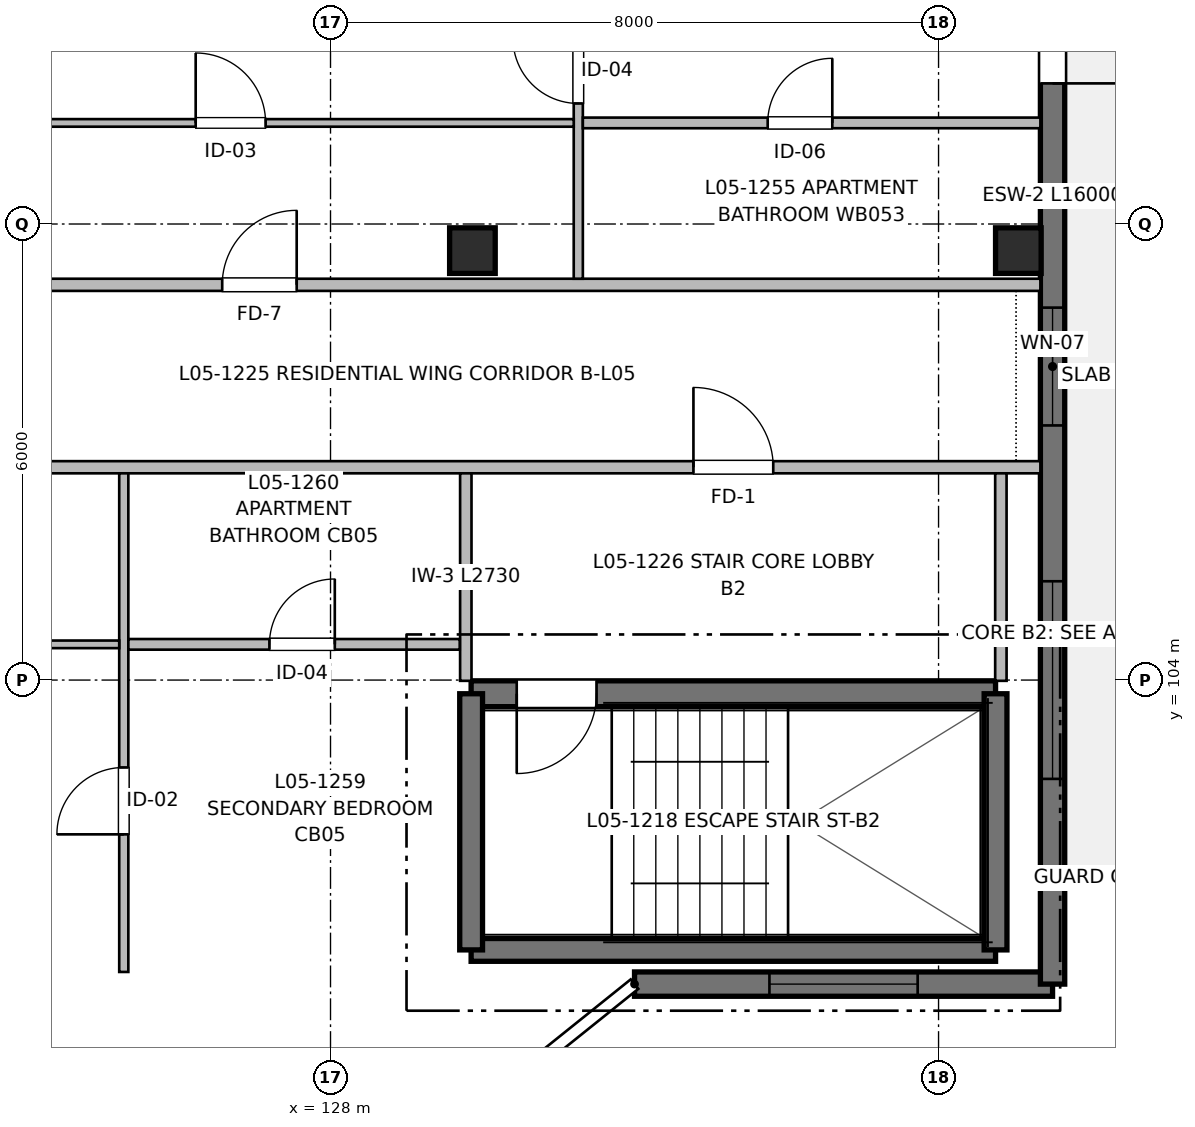
"""IFC4 building model, lengths in metres.
Left out: names, types, materials, properties, quantities, classifications, styles, units other than length and angle.
Written with IfcOpenShell. Run it as: python <this file> out.ifc"""

import sys

from ifc_helpers import new_model, si_unit, direction, frame, frame_2d, origin, origin_2d, place, context, subcontext, project, spatial, rectangle, extrude, element, fill, save


model = new_model("IFC4")
c1 = context("Model", 3, precision=1e-05, world=origin(), true_north=direction((0.0, 1.0)))
c2 = subcontext(c1, "Body", "Model", "MODEL_VIEW")
j1 = project(units=[si_unit("LENGTHUNIT", "METRE"), si_unit("PLANEANGLEUNIT", "RADIAN")], contexts=[c1])
p1 = place(None, origin())
s1 = spatial("IfcSite", under=j1, at=p1, CompositionType="ELEMENT")
p2 = place(p1, origin())
s2 = spatial("IfcBuilding", under=s1, at=p2, CompositionType="ELEMENT")
p3 = place(p2, frame((0.0, 0.0, 16.96)))
s3 = spatial("IfcBuildingStorey", under=s2, at=p3, CompositionType="ELEMENT", Elevation=16.96)
for number, where, z_axis, x_axis in (
    (1, (129.867, 109.65, 0.0), (0.0, 0.0, 1.0), (1.0, 0.0, 0.0)),
    (2, (137.05, 109.65, 0.0), (0.0, 0.0, 1.0), (1.0, 0.0, 0.0)),
):
    element("IfcColumn", number, at=place(p3, frame(where, z_axis=z_axis, x_axis=x_axis)), inside=s3, PredefinedType="COLUMN", context=c2, shape_type="SweptSolid", body=[
        extrude(rectangle(XDim=0.6, YDim=0.6, at=origin_2d()), origin(), (0.0, 0.0, 1.0), 3.2),
    ])
p4 = place(p3, frame((129.85, 100.45, 0.0), z_axis=(0.0, 0.0, 1.0), x_axis=(1.0, 0.0, 0.0)))
e3 = element("IfcWall", 3, at=p4, inside=s3, PredefinedType="SHEAR", context=c2, shape_type="SweptSolid", body=[
    extrude(rectangle(XDim=6.9, YDim=0.3, at=frame_2d((3.45, 0.0))), origin(), (0.0, 0.0, 1.0), 3.2),
])
p5 = place(p3, frame((136.75, 103.82, 0.0), z_axis=(0.0, 0.0, 1.0), x_axis=(-1.0, 0.0, 0.0)))
e4 = element("IfcWall", 4, at=p5, inside=s3, PredefinedType="SHEAR", context=c2, shape_type="SweptSolid", body=[
    extrude(rectangle(XDim=6.9, YDim=0.34, at=frame_2d((3.45, 0.0))), origin(), (0.0, 0.0, 1.0), 3.2),
])
p6 = place(p5, frame((5.25, 0.0, 0.0)))
e5 = element("IfcOpeningElement", 5, at=p6, cuts=e4, PredefinedType="OPENING", context=c2, shape_type="SweptSolid", body=[
    extrude(rectangle(XDim=1.05, YDim=2.15, at=frame_2d((0.525, 1.075))), frame((0.0, 0.18, 0.0), z_axis=(0.0, -1.0, 0.0), x_axis=(1.0, 0.0, 0.0)), (0.0, 0.0, 1.0), 0.36),
])
for number, where, z_axis, x_axis in (
    (6, (129.85, 103.82, 0.0), (0.0, 0.0, 1.0), (0.0, -1.0, 0.0)),
    (7, (136.75, 100.45, 0.0), (0.0, 0.0, 1.0), (0.0, 1.0, 0.0)),
):
    element("IfcWall", number, at=place(p3, frame(where, z_axis=z_axis, x_axis=x_axis)), inside=s3, PredefinedType="SHEAR", context=c2, shape_type="SweptSolid", body=[
        extrude(rectangle(XDim=3.37, YDim=0.3, at=frame_2d((1.685, 0.0))), origin(), (0.0, 0.0, 1.0), 3.2),
    ])
p7 = place(p3, frame((137.5, 100.0, 0.0), z_axis=(0.0, 0.0, 1.0), x_axis=(-1.0, 0.0, 0.0)))
e8 = element("IfcWall", 8, at=p7, inside=s3, PredefinedType="SHEAR", context=c2, shape_type="SweptSolid", body=[
    extrude(rectangle(XDim=5.5, YDim=0.32, at=frame_2d((2.75, 0.0))), origin(), (0.0, 0.0, 1.0), 2.98),
])
p8 = place(p7, frame((1.775, 0.0, 0.72)))
e9 = element("IfcOpeningElement", 9, at=p8, cuts=e8, PredefinedType="OPENING", context=c2, shape_type="SweptSolid", body=[
    extrude(rectangle(XDim=1.95, YDim=1.5, at=frame_2d((0.975, 0.75))), frame((0.0, 0.17, 0.0), z_axis=(0.0, -1.0, 0.0), x_axis=(1.0, 0.0, 0.0)), (0.0, 0.0, 1.0), 0.34),
])
p9 = place(p3, frame((137.5, 116.0, 0.0), z_axis=(0.0, 0.0, 1.0), x_axis=(0.0, -1.0, 0.0)))
e10 = element("IfcWall", 10, at=p9, inside=s3, PredefinedType="SHEAR", context=c2, shape_type="SweptSolid", body=[
    extrude(rectangle(XDim=16.0, YDim=0.32, at=frame_2d((8.0, 0.0))), origin(), (0.0, 0.0, 1.0), 2.98),
])
p10 = place(p9, frame((2.95, 0.0, 0.0)))
e11 = element("IfcOpeningElement", 11, at=p10, cuts=e10, PredefinedType="OPENING", context=c2, shape_type="SweptSolid", body=[
    extrude(rectangle(XDim=1.2, YDim=2.2, at=frame_2d((0.6, 1.1))), frame((0.0, 0.17, 0.0), z_axis=(0.0, -1.0, 0.0), x_axis=(1.0, 0.0, 0.0)), (0.0, 0.0, 1.0), 0.34),
])
p11 = place(p9, frame((7.1, 0.0, 0.82)))
e12 = element("IfcOpeningElement", 12, at=p11, cuts=e10, PredefinedType="OPENING", context=c2, shape_type="SweptSolid", body=[
    extrude(rectangle(XDim=1.55, YDim=1.4, at=frame_2d((0.775, 0.7))), frame((0.0, 0.17, 0.0), z_axis=(0.0, -1.0, 0.0), x_axis=(1.0, 0.0, 0.0)), (0.0, 0.0, 1.0), 0.34),
])
p12 = place(p9, frame((10.7, 0.0, 0.67)))
e13 = element("IfcOpeningElement", 13, at=p12, cuts=e10, PredefinedType="OPENING", context=c2, shape_type="SweptSolid", body=[
    extrude(rectangle(XDim=2.6, YDim=1.55, at=frame_2d((1.3, 0.775))), frame((0.0, 0.17, 0.0), z_axis=(0.0, -1.0, 0.0), x_axis=(1.0, 0.0, 0.0)), (0.0, 0.0, 1.0), 0.34),
])
p13 = place(p3, frame((113.2, 106.8, 0.0), z_axis=(0.0, 0.0, 1.0), x_axis=(1.0, 0.0, 0.0)))
e14 = element("IfcWall", 14, at=p13, inside=s3, PredefinedType="PARTITIONING", context=c2, shape_type="SweptSolid", body=[
    extrude(rectangle(XDim=24.14, YDim=0.16, at=frame_2d((12.07, 0.0))), origin(), (0.0, 0.0, 1.0), 2.935),
])
p14 = place(p13, frame((19.575, 0.0, 0.0)))
e15 = element("IfcOpeningElement", 15, at=p14, cuts=e14, PredefinedType="OPENING", context=c2, shape_type="SweptSolid", body=[
    extrude(rectangle(XDim=1.05, YDim=2.15, at=frame_2d((0.525, 1.075))), frame((0.0, 0.09, 0.0), z_axis=(0.0, -1.0, 0.0), x_axis=(1.0, 0.0, 0.0)), (0.0, 0.0, 1.0), 0.18),
])
p15 = place(p13, frame((8.995, 0.0, 0.0)))
e16 = element("IfcOpeningElement", 16, at=p15, cuts=e14, PredefinedType="OPENING", context=c2, shape_type="SweptSolid", body=[
    extrude(rectangle(XDim=0.98, YDim=2.15, at=frame_2d((0.49, 1.075))), frame((0.0, 0.09, 0.0), z_axis=(0.0, -1.0, 0.0), x_axis=(1.0, 0.0, 0.0)), (0.0, 0.0, 1.0), 0.18),
])
p16 = place(p3, frame((93.66, 109.2, 0.0), z_axis=(0.0, 0.0, 1.0), x_axis=(1.0, 0.0, 0.0)))
e17 = element("IfcWall", 17, at=p16, inside=s3, PredefinedType="PARTITIONING", context=c2, shape_type="SweptSolid", body=[
    extrude(rectangle(XDim=43.68, YDim=0.16, at=frame_2d((21.84, 0.0))), origin(), (0.0, 0.0, 1.0), 2.935),
])
p17 = place(p16, frame((3.705, 0.0, 0.0)))
e18 = element("IfcOpeningElement", 18, at=p17, cuts=e17, PredefinedType="OPENING", context=c2, shape_type="SweptSolid", body=[
    extrude(rectangle(XDim=0.98, YDim=2.15, at=frame_2d((0.49, 1.075))), frame((0.0, 0.09, 0.0), z_axis=(0.0, -1.0, 0.0), x_axis=(1.0, 0.0, 0.0)), (0.0, 0.0, 1.0), 0.18),
])
p18 = place(p16, frame((18.33, 0.0, 0.0)))
e19 = element("IfcOpeningElement", 19, at=p18, cuts=e17, PredefinedType="OPENING", context=c2, shape_type="SweptSolid", body=[
    extrude(rectangle(XDim=0.98, YDim=2.15, at=frame_2d((0.49, 1.075))), frame((0.0, 0.09, 0.0), z_axis=(0.0, -1.0, 0.0), x_axis=(1.0, 0.0, 0.0)), (0.0, 0.0, 1.0), 0.18),
])
p19 = place(p16, frame((32.915, 0.0, 0.0)))
e20 = element("IfcOpeningElement", 20, at=p19, cuts=e17, PredefinedType="OPENING", context=c2, shape_type="SweptSolid", body=[
    extrude(rectangle(XDim=0.98, YDim=2.15, at=frame_2d((0.49, 1.075))), frame((0.0, 0.09, 0.0), z_axis=(0.0, -1.0, 0.0), x_axis=(1.0, 0.0, 0.0)), (0.0, 0.0, 1.0), 0.18),
])
for number, where, z_axis, x_axis in (
    (21, (129.78, 103.99, 0.0), (0.0, 0.0, 1.0), (0.0, 1.0, 0.0)),
    (22, (136.82, 103.99, 0.0), (0.0, 0.0, 1.0), (0.0, 1.0, 0.0)),
):
    element("IfcWall", number, at=place(p3, frame(where, z_axis=z_axis, x_axis=x_axis)), inside=s3, PredefinedType="PARTITIONING", context=c2, shape_type="SweptSolid", body=[
        extrude(rectangle(XDim=2.73, YDim=0.15, at=frame_2d((1.365, 0.0))), origin(), (0.0, 0.0, 1.0), 2.935),
    ])
p20 = place(p3, frame((131.26, 109.28, 0.0), z_axis=(0.0, 0.0, 1.0), x_axis=(0.0, 1.0, 0.0)))
e23 = element("IfcWall", 23, at=p20, inside=s3, PredefinedType="PARTITIONING", context=c2, shape_type="SweptSolid", body=[
    extrude(rectangle(XDim=6.6, YDim=0.12, at=frame_2d((3.3, 0.0))), origin(), (0.0, 0.0, 1.0), 2.935),
])
p21 = place(p20, frame((2.306, 0.0, 0.0)))
e24 = element("IfcOpeningElement", 24, at=p21, cuts=e23, PredefinedType="OPENING", context=c2, shape_type="SweptSolid", body=[
    extrude(rectangle(XDim=0.86, YDim=2.1, at=frame_2d((0.43, 1.05))), frame((0.0, 0.07, 0.0), z_axis=(0.0, -1.0, 0.0), x_axis=(1.0, 0.0, 0.0)), (0.0, 0.0, 1.0), 0.14),
])
p22 = place(p20, frame((4.097, 0.0, 0.0)))
e25 = element("IfcOpeningElement", 25, at=p22, cuts=e23, PredefinedType="OPENING", context=c2, shape_type="SweptSolid", body=[
    extrude(rectangle(XDim=0.9, YDim=2.1, at=frame_2d((0.45, 1.05))), frame((0.0, 0.07, 0.0), z_axis=(0.0, -1.0, 0.0), x_axis=(1.0, 0.0, 0.0)), (0.0, 0.0, 1.0), 0.14),
])
p23 = place(p3, frame((131.32, 111.33, 0.0), z_axis=(0.0, 0.0, 1.0), x_axis=(1.0, 0.0, 0.0)))
e26 = element("IfcWall", 26, at=p23, inside=s3, PredefinedType="PARTITIONING", context=c2, shape_type="SweptSolid", body=[
    extrude(rectangle(XDim=6.02, YDim=0.14, at=frame_2d((3.01, 0.0))), origin(), (0.0, 0.0, 1.0), 2.935),
])
p24 = place(p23, frame((2.432, 0.0, 0.0)))
e27 = element("IfcOpeningElement", 27, at=p24, cuts=e26, PredefinedType="OPENING", context=c2, shape_type="SweptSolid", body=[
    extrude(rectangle(XDim=0.85, YDim=2.05, at=frame_2d((0.425, 1.025))), frame((0.0, 0.08, 0.0), z_axis=(0.0, -1.0, 0.0), x_axis=(1.0, 0.0, 0.0)), (0.0, 0.0, 1.0), 0.16),
])
p25 = place(p3, frame((122.87, 111.33, 0.0), z_axis=(0.0, 0.0, 1.0), x_axis=(1.0, 0.0, 0.0)))
e28 = element("IfcWall", 28, at=p25, inside=s3, PredefinedType="PARTITIONING", context=c2, shape_type="SweptSolid", body=[
    extrude(rectangle(XDim=8.33, YDim=0.1, at=frame_2d((4.165, 0.0))), origin(), (0.0, 0.0, 1.0), 2.935),
])
p26 = place(p25, frame((3.356, 0.0, 0.0)))
e29 = element("IfcOpeningElement", 29, at=p26, cuts=e28, PredefinedType="OPENING", context=c2, shape_type="SweptSolid", body=[
    extrude(rectangle(XDim=0.92, YDim=2.1, at=frame_2d((0.46, 1.05))), frame((0.0, 0.06, 0.0), z_axis=(0.0, -1.0, 0.0), x_axis=(1.0, 0.0, 0.0)), (0.0, 0.0, 1.0), 0.12),
])
p27 = place(p3, frame((125.28, 100.16, 0.0), z_axis=(0.0, 0.0, 1.0), x_axis=(0.0, 1.0, 0.0)))
e30 = element("IfcWall", 30, at=p27, inside=s3, PredefinedType="PARTITIONING", context=c2, shape_type="SweptSolid", body=[
    extrude(rectangle(XDim=6.56, YDim=0.12, at=frame_2d((3.28, 0.0))), origin(), (0.0, 0.0, 1.0), 2.935),
])
p28 = place(p27, frame((1.81, 0.0, 0.0)))
e31 = element("IfcOpeningElement", 31, at=p28, cuts=e30, PredefinedType="OPENING", context=c2, shape_type="SweptSolid", body=[
    extrude(rectangle(XDim=0.88, YDim=2.1, at=frame_2d((0.44, 1.05))), frame((0.0, 0.07, 0.0), z_axis=(0.0, -1.0, 0.0), x_axis=(1.0, 0.0, 0.0)), (0.0, 0.0, 1.0), 0.14),
])
p29 = place(p3, frame((125.34, 104.47, 0.0), z_axis=(0.0, 0.0, 1.0), x_axis=(1.0, 0.0, 0.0)))
e32 = element("IfcWall", 32, at=p29, inside=s3, PredefinedType="PARTITIONING", context=c2, shape_type="SweptSolid", body=[
    extrude(rectangle(XDim=4.36, YDim=0.14, at=frame_2d((2.18, 0.0))), origin(), (0.0, 0.0, 1.0), 2.935),
])
p30 = place(p29, frame((1.856, 0.0, 0.0)))
e33 = element("IfcOpeningElement", 33, at=p30, cuts=e32, PredefinedType="OPENING", context=c2, shape_type="SweptSolid", body=[
    extrude(rectangle(XDim=0.86, YDim=2.1, at=frame_2d((0.43, 1.05))), frame((0.0, 0.08, 0.0), z_axis=(0.0, -1.0, 0.0), x_axis=(1.0, 0.0, 0.0)), (0.0, 0.0, 1.0), 0.16),
])
p31 = place(p3, frame((120.09, 104.47, 0.0), z_axis=(0.0, 0.0, 1.0), x_axis=(1.0, 0.0, 0.0)))
e34 = element("IfcWall", 34, at=p31, inside=s3, PredefinedType="PARTITIONING", context=c2, shape_type="SweptSolid", body=[
    extrude(rectangle(XDim=5.13, YDim=0.1, at=frame_2d((2.565, 0.0))), origin(), (0.0, 0.0, 1.0), 2.935),
])
p32 = place(p31, frame((2.18, 0.0, 0.0)))
e35 = element("IfcOpeningElement", 35, at=p32, cuts=e34, PredefinedType="OPENING", context=c2, shape_type="SweptSolid", body=[
    extrude(rectangle(XDim=0.92, YDim=2.1, at=frame_2d((0.46, 1.05))), frame((0.0, 0.06, 0.0), z_axis=(0.0, -1.0, 0.0), x_axis=(1.0, 0.0, 0.0)), (0.0, 0.0, 1.0), 0.12),
])
p33 = place(p6, origin())
e36 = element("IfcDoor", 36, at=p33, inside=s3, OperationType="SINGLE_SWING_RIGHT", PredefinedType="DOOR", context=c2, shape_type="SweptSolid", body=[
    extrude(rectangle(XDim=1.05, YDim=2.15, at=frame_2d((0.525, 1.075))), frame((0.0, 0.025, 0.0), z_axis=(0.0, -1.0, 0.0), x_axis=(1.0, 0.0, 0.0)), (0.0, 0.0, 1.0), 0.05),
])
fill(e5, e36)
p34 = place(p8, origin())
e37 = element("IfcWindow", 37, at=p34, inside=s3, PartitioningType="SINGLE_PANEL", PredefinedType="WINDOW", context=c2, shape_type="SweptSolid", body=[
    extrude(rectangle(XDim=1.95, YDim=1.5, at=frame_2d((0.975, 0.75))), frame((0.0, 0.03, 0.0), z_axis=(0.0, -1.0, 0.0), x_axis=(1.0, 0.0, 0.0)), (0.0, 0.0, 1.0), 0.06),
])
fill(e9, e37)
p35 = place(p10, origin())
e38 = element("IfcDoor", 38, at=p35, inside=s3, OperationType="SINGLE_SWING_RIGHT", PredefinedType="DOOR", context=c2, shape_type="SweptSolid", body=[
    extrude(rectangle(XDim=1.2, YDim=2.2, at=frame_2d((0.6, 1.1))), frame((0.0, 0.025, 0.0), z_axis=(0.0, -1.0, 0.0), x_axis=(1.0, 0.0, 0.0)), (0.0, 0.0, 1.0), 0.05),
])
fill(e11, e38)
p36 = place(p11, origin())
e39 = element("IfcWindow", 39, at=p36, inside=s3, PartitioningType="SINGLE_PANEL", PredefinedType="WINDOW", context=c2, shape_type="SweptSolid", body=[
    extrude(rectangle(XDim=1.55, YDim=1.4, at=frame_2d((0.775, 0.7))), frame((0.0, 0.03, 0.0), z_axis=(0.0, -1.0, 0.0), x_axis=(1.0, 0.0, 0.0)), (0.0, 0.0, 1.0), 0.06),
])
fill(e12, e39)
p37 = place(p12, origin())
e40 = element("IfcWindow", 40, at=p37, inside=s3, PartitioningType="SINGLE_PANEL", PredefinedType="WINDOW", context=c2, shape_type="SweptSolid", body=[
    extrude(rectangle(XDim=2.6, YDim=1.55, at=frame_2d((1.3, 0.775))), frame((0.0, 0.03, 0.0), z_axis=(0.0, -1.0, 0.0), x_axis=(1.0, 0.0, 0.0)), (0.0, 0.0, 1.0), 0.06),
])
fill(e13, e40)
p38 = place(p14, origin())
e41 = element("IfcDoor", 41, at=p38, inside=s3, OperationType="SINGLE_SWING_LEFT", PredefinedType="DOOR", context=c2, shape_type="SweptSolid", body=[
    extrude(rectangle(XDim=1.05, YDim=2.15, at=frame_2d((0.525, 1.075))), frame((0.0, 0.025, 0.0), z_axis=(0.0, -1.0, 0.0), x_axis=(1.0, 0.0, 0.0)), (0.0, 0.0, 1.0), 0.05),
])
fill(e15, e41)
p39 = place(p19, origin())
e42 = element("IfcDoor", 42, at=p39, inside=s3, OperationType="SINGLE_SWING_RIGHT", PredefinedType="DOOR", context=c2, shape_type="SweptSolid", body=[
    extrude(rectangle(XDim=0.98, YDim=2.15, at=frame_2d((0.49, 1.075))), frame((0.0, 0.025, 0.0), z_axis=(0.0, -1.0, 0.0), x_axis=(1.0, 0.0, 0.0)), (0.0, 0.0, 1.0), 0.05),
])
fill(e20, e42)
p40 = place(p26, origin())
e43 = element("IfcDoor", 43, at=p40, inside=s3, OperationType="SINGLE_SWING_LEFT", PredefinedType="DOOR", context=c2, shape_type="SweptSolid", body=[
    extrude(rectangle(XDim=0.92, YDim=2.1, at=frame_2d((0.46, 1.05))), frame((0.0, 0.025, 0.0), z_axis=(0.0, -1.0, 0.0), x_axis=(1.0, 0.0, 0.0)), (0.0, 0.0, 1.0), 0.05),
])
fill(e29, e43)
p41 = place(p21, origin())
e44 = element("IfcDoor", 44, at=p41, inside=s3, OperationType="SINGLE_SWING_RIGHT", PredefinedType="DOOR", context=c2, shape_type="SweptSolid", body=[
    extrude(rectangle(XDim=0.86, YDim=2.1, at=frame_2d((0.43, 1.05))), frame((0.0, 0.025, 0.0), z_axis=(0.0, -1.0, 0.0), x_axis=(1.0, 0.0, 0.0)), (0.0, 0.0, 1.0), 0.05),
])
fill(e24, e44)
p42 = place(p24, origin())
e45 = element("IfcDoor", 45, at=p42, inside=s3, OperationType="SINGLE_SWING_RIGHT", PredefinedType="DOOR", context=c2, shape_type="SweptSolid", body=[
    extrude(rectangle(XDim=0.85, YDim=2.05, at=frame_2d((0.425, 1.025))), frame((0.0, 0.025, 0.0), z_axis=(0.0, -1.0, 0.0), x_axis=(1.0, 0.0, 0.0)), (0.0, 0.0, 1.0), 0.05),
])
fill(e27, e45)
p43 = place(p28, origin())
e46 = element("IfcDoor", 46, at=p43, inside=s3, OperationType="SINGLE_SWING_LEFT", PredefinedType="DOOR", context=c2, shape_type="SweptSolid", body=[
    extrude(rectangle(XDim=0.88, YDim=2.1, at=frame_2d((0.44, 1.05))), frame((0.0, 0.025, 0.0), z_axis=(0.0, -1.0, 0.0), x_axis=(1.0, 0.0, 0.0)), (0.0, 0.0, 1.0), 0.05),
])
fill(e31, e46)
p44 = place(p30, origin())
e47 = element("IfcDoor", 47, at=p44, inside=s3, OperationType="SINGLE_SWING_RIGHT", PredefinedType="DOOR", context=c2, shape_type="SweptSolid", body=[
    extrude(rectangle(XDim=0.86, YDim=2.1, at=frame_2d((0.43, 1.05))), frame((0.0, 0.025, 0.0), z_axis=(0.0, -1.0, 0.0), x_axis=(1.0, 0.0, 0.0)), (0.0, 0.0, 1.0), 0.05),
])
fill(e33, e47)
save(model, sys.argv[1])
